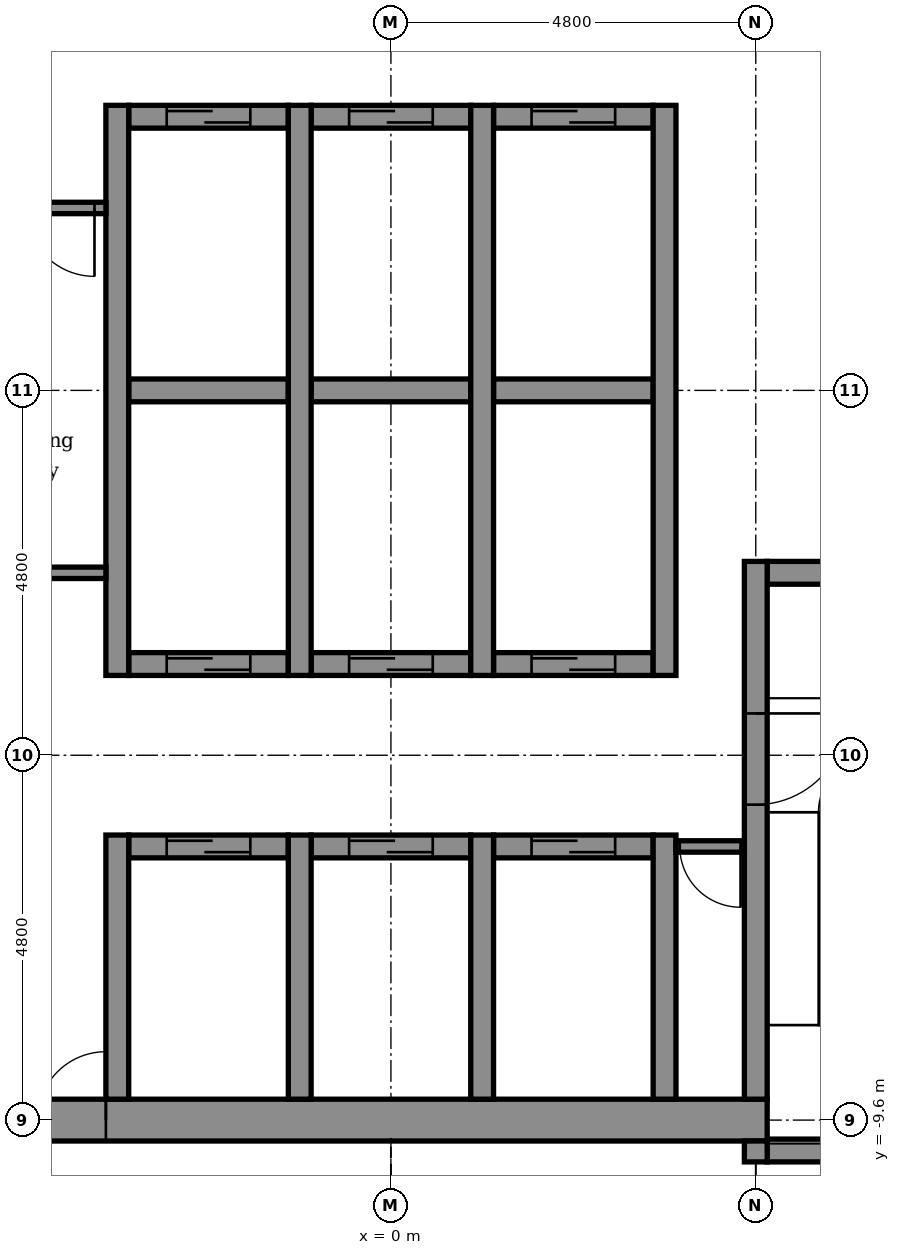
"""IFC4 building model, lengths in metres.
Left out: names, types, materials, properties, quantities, classifications, styles, units other than length and angle.
Written with IfcOpenShell. Run it as: python <this file> out.ifc"""

import sys

from ifc_helpers import new_model, si_unit, direction, frame, frame_2d, origin, place, context, subcontext, project, spatial, rectangle, extrude, element, fill, save


model = new_model("IFC4")
c1 = context("Model", 3, precision=1e-05, world=origin(), true_north=direction((0.0, 1.0)))
c2 = subcontext(c1, "Body", "Model", "MODEL_VIEW")
j1 = project(units=[si_unit("LENGTHUNIT", "METRE"), si_unit("PLANEANGLEUNIT", "RADIAN")], contexts=[c1])
p1 = place(None, origin())
s1 = spatial("IfcSite", under=j1, at=p1, CompositionType="ELEMENT")
p2 = place(p1, origin())
s2 = spatial("IfcBuilding", under=s1, at=p2, CompositionType="ELEMENT")
p3 = place(p2, frame((0.0, 0.0, 254.0)))
s3 = spatial("IfcBuildingStorey", under=s2, at=p3, CompositionType="ELEMENT", Elevation=254.0)
p4 = place(p3, frame((4.95, -10.0, -0.15), z_axis=(0.0, 0.0, 1.0), x_axis=(1.0, 0.0, 0.0)))
e1 = element("IfcWall", 1, at=p4, inside=s3, PredefinedType="STANDARD", context=c2, shape_type="SweptSolid", body=[
    extrude(rectangle(XDim=4.375, YDim=0.3, at=frame_2d((2.188, 0.0))), origin(), (0.0, 0.0, 1.0), 3.9),
])
p5 = place(p3, frame((-5.25, -9.6, -0.15), z_axis=(0.0, 0.0, 1.0), x_axis=(1.0, 0.0, 0.0)))
e2 = element("IfcWall", 2, at=p5, inside=s3, PredefinedType="SHEAR", context=c2, shape_type="SweptSolid", body=[
    extrude(rectangle(XDim=10.2, YDim=0.55, at=frame_2d((5.1, 0.0))), origin(), (0.0, 0.0, 1.0), 3.9),
])
p6 = place(p5, frame((0.6, 0.0, 0.15)))
e3 = element("IfcOpeningElement", 3, at=p6, cuts=e2, PredefinedType="OPENING", context=c2, shape_type="SweptSolid", body=[
    extrude(rectangle(XDim=0.9, YDim=2.1, at=frame_2d((0.45, 1.05))), frame((0.0, 0.285, 0.0), z_axis=(0.0, -1.0, 0.0), x_axis=(1.0, 0.0, 0.0)), (0.0, 0.0, 1.0), 0.57),
])
p7 = place(p3, frame((-3.45, -6.0, -0.15), z_axis=(0.0, 0.0, 1.0), x_axis=(1.0, 0.0, 0.0)))
e4 = element("IfcWall", 4, at=p7, inside=s3, PredefinedType="STANDARD", context=c2, shape_type="SweptSolid", body=[
    extrude(rectangle(XDim=2.1, YDim=0.3, at=frame_2d((1.05, 0.0))), origin(), (0.0, 0.0, 1.0), 3.9),
])
p8 = place(p7, frame((0.5, 0.0, 0.15)))
e5 = element("IfcOpeningElement", 5, at=p8, cuts=e4, PredefinedType="OPENING", context=c2, shape_type="SweptSolid", body=[
    extrude(rectangle(XDim=1.1, YDim=2.1, at=frame_2d((0.55, 1.05))), frame((0.0, 0.16, 0.0), z_axis=(0.0, -1.0, 0.0), x_axis=(1.0, 0.0, 0.0)), (0.0, 0.0, 1.0), 0.32),
])
p9 = place(p3, frame((-1.05, -6.0, -0.15), z_axis=(0.0, 0.0, 1.0), x_axis=(1.0, 0.0, 0.0)))
e6 = element("IfcWall", 6, at=p9, inside=s3, PredefinedType="STANDARD", context=c2, shape_type="SweptSolid", body=[
    extrude(rectangle(XDim=2.1, YDim=0.3, at=frame_2d((1.05, 0.0))), origin(), (0.0, 0.0, 1.0), 3.9),
])
p10 = place(p9, frame((0.5, 0.0, 0.15)))
e7 = element("IfcOpeningElement", 7, at=p10, cuts=e6, PredefinedType="OPENING", context=c2, shape_type="SweptSolid", body=[
    extrude(rectangle(XDim=1.1, YDim=2.1, at=frame_2d((0.55, 1.05))), frame((0.0, 0.16, 0.0), z_axis=(0.0, -1.0, 0.0), x_axis=(1.0, 0.0, 0.0)), (0.0, 0.0, 1.0), 0.32),
])
p11 = place(p3, frame((1.35, -6.0, -0.15), z_axis=(0.0, 0.0, 1.0), x_axis=(1.0, 0.0, 0.0)))
e8 = element("IfcWall", 8, at=p11, inside=s3, PredefinedType="STANDARD", context=c2, shape_type="SweptSolid", body=[
    extrude(rectangle(XDim=2.1, YDim=0.3, at=frame_2d((1.05, 0.0))), origin(), (0.0, 0.0, 1.0), 3.9),
])
p12 = place(p11, frame((0.5, 0.0, 0.15)))
e9 = element("IfcOpeningElement", 9, at=p12, cuts=e8, PredefinedType="OPENING", context=c2, shape_type="SweptSolid", body=[
    extrude(rectangle(XDim=1.1, YDim=2.1, at=frame_2d((0.55, 1.05))), frame((0.0, 0.16, 0.0), z_axis=(0.0, -1.0, 0.0), x_axis=(1.0, 0.0, 0.0)), (0.0, 0.0, 1.0), 0.32),
])
p13 = place(p3, frame((-3.45, -3.6, -0.15), z_axis=(0.0, 0.0, 1.0), x_axis=(1.0, 0.0, 0.0)))
e10 = element("IfcWall", 10, at=p13, inside=s3, PredefinedType="STANDARD", context=c2, shape_type="SweptSolid", body=[
    extrude(rectangle(XDim=2.1, YDim=0.3, at=frame_2d((1.05, 0.0))), origin(), (0.0, 0.0, 1.0), 3.9),
])
p14 = place(p13, frame((0.5, 0.0, 0.15)))
e11 = element("IfcOpeningElement", 11, at=p14, cuts=e10, PredefinedType="OPENING", context=c2, shape_type="SweptSolid", body=[
    extrude(rectangle(XDim=1.1, YDim=2.1, at=frame_2d((0.55, 1.05))), frame((0.0, 0.16, 0.0), z_axis=(0.0, -1.0, 0.0), x_axis=(1.0, 0.0, 0.0)), (0.0, 0.0, 1.0), 0.32),
])
p15 = place(p3, frame((-1.05, -3.6, -0.15), z_axis=(0.0, 0.0, 1.0), x_axis=(1.0, 0.0, 0.0)))
e12 = element("IfcWall", 12, at=p15, inside=s3, PredefinedType="STANDARD", context=c2, shape_type="SweptSolid", body=[
    extrude(rectangle(XDim=2.1, YDim=0.3, at=frame_2d((1.05, 0.0))), origin(), (0.0, 0.0, 1.0), 3.9),
])
p16 = place(p15, frame((0.5, 0.0, 0.15)))
e13 = element("IfcOpeningElement", 13, at=p16, cuts=e12, PredefinedType="OPENING", context=c2, shape_type="SweptSolid", body=[
    extrude(rectangle(XDim=1.1, YDim=2.1, at=frame_2d((0.55, 1.05))), frame((0.0, 0.16, 0.0), z_axis=(0.0, -1.0, 0.0), x_axis=(1.0, 0.0, 0.0)), (0.0, 0.0, 1.0), 0.32),
])
p17 = place(p3, frame((1.35, -3.6, -0.15), z_axis=(0.0, 0.0, 1.0), x_axis=(1.0, 0.0, 0.0)))
e14 = element("IfcWall", 14, at=p17, inside=s3, PredefinedType="STANDARD", context=c2, shape_type="SweptSolid", body=[
    extrude(rectangle(XDim=2.1, YDim=0.3, at=frame_2d((1.05, 0.0))), origin(), (0.0, 0.0, 1.0), 3.9),
])
p18 = place(p17, frame((0.5, 0.0, 0.15)))
e15 = element("IfcOpeningElement", 15, at=p18, cuts=e14, PredefinedType="OPENING", context=c2, shape_type="SweptSolid", body=[
    extrude(rectangle(XDim=1.1, YDim=2.1, at=frame_2d((0.55, 1.05))), frame((0.0, 0.16, 0.0), z_axis=(0.0, -1.0, 0.0), x_axis=(1.0, 0.0, 0.0)), (0.0, 0.0, 1.0), 0.32),
])
p19 = place(p3, frame((4.95, -2.4, -0.15), z_axis=(0.0, 0.0, 1.0), x_axis=(1.0, 0.0, 0.0)))
e16 = element("IfcWall", 16, at=p19, inside=s3, PredefinedType="STANDARD", context=c2, shape_type="SweptSolid", body=[
    extrude(rectangle(XDim=0.9, YDim=0.3, at=frame_2d((0.45, 0.0))), origin(), (0.0, 0.0, 1.0), 3.9),
])
p20 = place(p3, frame((-3.45, 0.0, -0.15), z_axis=(0.0, 0.0, 1.0), x_axis=(1.0, 0.0, 0.0)))
e17 = element("IfcWall", 17, at=p20, inside=s3, PredefinedType="STANDARD", context=c2, shape_type="SweptSolid", body=[
    extrude(rectangle(XDim=2.1, YDim=0.3, at=frame_2d((1.05, 0.0))), origin(), (0.0, 0.0, 1.0), 3.9),
])
p21 = place(p3, frame((-1.05, 0.0, -0.15), z_axis=(0.0, 0.0, 1.0), x_axis=(1.0, 0.0, 0.0)))
e18 = element("IfcWall", 18, at=p21, inside=s3, PredefinedType="STANDARD", context=c2, shape_type="SweptSolid", body=[
    extrude(rectangle(XDim=2.1, YDim=0.3, at=frame_2d((1.05, 0.0))), origin(), (0.0, 0.0, 1.0), 3.9),
])
p22 = place(p3, frame((1.35, 0.0, -0.15), z_axis=(0.0, 0.0, 1.0), x_axis=(1.0, 0.0, 0.0)))
e19 = element("IfcWall", 19, at=p22, inside=s3, PredefinedType="STANDARD", context=c2, shape_type="SweptSolid", body=[
    extrude(rectangle(XDim=2.1, YDim=0.3, at=frame_2d((1.05, 0.0))), origin(), (0.0, 0.0, 1.0), 3.9),
])
p23 = place(p3, frame((-3.45, 3.6, -0.15), z_axis=(0.0, 0.0, 1.0), x_axis=(1.0, 0.0, 0.0)))
e20 = element("IfcWall", 20, at=p23, inside=s3, PredefinedType="STANDARD", context=c2, shape_type="SweptSolid", body=[
    extrude(rectangle(XDim=2.1, YDim=0.3, at=frame_2d((1.05, 0.0))), origin(), (0.0, 0.0, 1.0), 3.9),
])
p24 = place(p23, frame((0.5, 0.0, 0.15)))
e21 = element("IfcOpeningElement", 21, at=p24, cuts=e20, PredefinedType="OPENING", context=c2, shape_type="SweptSolid", body=[
    extrude(rectangle(XDim=1.1, YDim=2.1, at=frame_2d((0.55, 1.05))), frame((0.0, 0.16, 0.0), z_axis=(0.0, -1.0, 0.0), x_axis=(1.0, 0.0, 0.0)), (0.0, 0.0, 1.0), 0.32),
])
p25 = place(p3, frame((-1.05, 3.6, -0.15), z_axis=(0.0, 0.0, 1.0), x_axis=(1.0, 0.0, 0.0)))
e22 = element("IfcWall", 22, at=p25, inside=s3, PredefinedType="STANDARD", context=c2, shape_type="SweptSolid", body=[
    extrude(rectangle(XDim=2.1, YDim=0.3, at=frame_2d((1.05, 0.0))), origin(), (0.0, 0.0, 1.0), 3.9),
])
p26 = place(p25, frame((0.5, 0.0, 0.15)))
e23 = element("IfcOpeningElement", 23, at=p26, cuts=e22, PredefinedType="OPENING", context=c2, shape_type="SweptSolid", body=[
    extrude(rectangle(XDim=1.1, YDim=2.1, at=frame_2d((0.55, 1.05))), frame((0.0, 0.16, 0.0), z_axis=(0.0, -1.0, 0.0), x_axis=(1.0, 0.0, 0.0)), (0.0, 0.0, 1.0), 0.32),
])
p27 = place(p3, frame((1.35, 3.6, -0.15), z_axis=(0.0, 0.0, 1.0), x_axis=(1.0, 0.0, 0.0)))
e24 = element("IfcWall", 24, at=p27, inside=s3, PredefinedType="STANDARD", context=c2, shape_type="SweptSolid", body=[
    extrude(rectangle(XDim=2.1, YDim=0.3, at=frame_2d((1.05, 0.0))), origin(), (0.0, 0.0, 1.0), 3.9),
])
p28 = place(p27, frame((0.5, 0.0, 0.15)))
e25 = element("IfcOpeningElement", 25, at=p28, cuts=e24, PredefinedType="OPENING", context=c2, shape_type="SweptSolid", body=[
    extrude(rectangle(XDim=1.1, YDim=2.1, at=frame_2d((0.55, 1.05))), frame((0.0, 0.16, 0.0), z_axis=(0.0, -1.0, 0.0), x_axis=(1.0, 0.0, 0.0)), (0.0, 0.0, 1.0), 0.32),
])
p29 = place(p3, frame((-3.6, -9.325, -0.15), z_axis=(0.0, 0.0, 1.0), x_axis=(0.0, 1.0, 0.0)))
e26 = element("IfcWall", 26, at=p29, inside=s3, PredefinedType="STANDARD", context=c2, shape_type="SweptSolid", body=[
    extrude(rectangle(XDim=3.475, YDim=0.3, at=frame_2d((1.737, 0.0))), origin(), (0.0, 0.0, 1.0), 3.9),
])
p30 = place(p3, frame((-3.6, -3.75, -0.15), z_axis=(0.0, 0.0, 1.0), x_axis=(0.0, 1.0, 0.0)))
e27 = element("IfcWall", 27, at=p30, inside=s3, PredefinedType="STANDARD", context=c2, shape_type="SweptSolid", body=[
    extrude(rectangle(XDim=7.5, YDim=0.3, at=frame_2d((3.75, 0.0))), origin(), (0.0, 0.0, 1.0), 3.9),
])
p31 = place(p3, frame((-1.2, -9.325, -0.15), z_axis=(0.0, 0.0, 1.0), x_axis=(0.0, 1.0, 0.0)))
e28 = element("IfcWall", 28, at=p31, inside=s3, PredefinedType="STANDARD", context=c2, shape_type="SweptSolid", body=[
    extrude(rectangle(XDim=3.475, YDim=0.3, at=frame_2d((1.737, 0.0))), origin(), (0.0, 0.0, 1.0), 3.9),
])
p32 = place(p3, frame((-1.2, -3.75, -0.15), z_axis=(0.0, 0.0, 1.0), x_axis=(0.0, 1.0, 0.0)))
e29 = element("IfcWall", 29, at=p32, inside=s3, PredefinedType="STANDARD", context=c2, shape_type="SweptSolid", body=[
    extrude(rectangle(XDim=7.5, YDim=0.3, at=frame_2d((3.75, 0.0))), origin(), (0.0, 0.0, 1.0), 3.9),
])
p33 = place(p3, frame((1.2, -9.325, -0.15), z_axis=(0.0, 0.0, 1.0), x_axis=(0.0, 1.0, 0.0)))
e30 = element("IfcWall", 30, at=p33, inside=s3, PredefinedType="STANDARD", context=c2, shape_type="SweptSolid", body=[
    extrude(rectangle(XDim=3.475, YDim=0.3, at=frame_2d((1.737, 0.0))), origin(), (0.0, 0.0, 1.0), 3.9),
])
p34 = place(p3, frame((1.2, -3.75, -0.15), z_axis=(0.0, 0.0, 1.0), x_axis=(0.0, 1.0, 0.0)))
e31 = element("IfcWall", 31, at=p34, inside=s3, PredefinedType="STANDARD", context=c2, shape_type="SweptSolid", body=[
    extrude(rectangle(XDim=7.5, YDim=0.3, at=frame_2d((3.75, 0.0))), origin(), (0.0, 0.0, 1.0), 3.9),
])
p35 = place(p3, frame((3.6, -9.325, -0.15), z_axis=(0.0, 0.0, 1.0), x_axis=(0.0, 1.0, 0.0)))
e32 = element("IfcWall", 32, at=p35, inside=s3, PredefinedType="STANDARD", context=c2, shape_type="SweptSolid", body=[
    extrude(rectangle(XDim=3.475, YDim=0.3, at=frame_2d((1.737, 0.0))), origin(), (0.0, 0.0, 1.0), 3.9),
])
p36 = place(p3, frame((3.6, -3.75, -0.15), z_axis=(0.0, 0.0, 1.0), x_axis=(0.0, 1.0, 0.0)))
e33 = element("IfcWall", 33, at=p36, inside=s3, PredefinedType="STANDARD", context=c2, shape_type="SweptSolid", body=[
    extrude(rectangle(XDim=7.5, YDim=0.3, at=frame_2d((3.75, 0.0))), origin(), (0.0, 0.0, 1.0), 3.9),
])
p37 = place(p3, frame((4.8, -10.15, -0.15), z_axis=(0.0, 0.0, 1.0), x_axis=(0.0, 1.0, 0.0)))
e34 = element("IfcWall", 34, at=p37, inside=s3, PredefinedType="STANDARD", context=c2, shape_type="SweptSolid", body=[
    extrude(rectangle(XDim=0.275, YDim=0.3, at=frame_2d((0.137, 0.0))), origin(), (0.0, 0.0, 1.0), 3.9),
])
p38 = place(p3, frame((4.8, -9.325, -0.15), z_axis=(0.0, 0.0, 1.0), x_axis=(0.0, 1.0, 0.0)))
e35 = element("IfcWall", 35, at=p38, inside=s3, PredefinedType="STANDARD", context=c2, shape_type="SweptSolid", body=[
    extrude(rectangle(XDim=7.075, YDim=0.3, at=frame_2d((3.538, 0.0))), origin(), (0.0, 0.0, 1.0), 3.9),
])
p39 = place(p38, frame((3.875, 0.0, 0.15)))
e36 = element("IfcOpeningElement", 36, at=p39, cuts=e35, PredefinedType="OPENING", context=c2, shape_type="SweptSolid", body=[
    extrude(rectangle(XDim=1.2, YDim=2.1, at=frame_2d((0.6, 1.05))), frame((0.0, 0.16, 0.0), z_axis=(0.0, -1.0, 0.0), x_axis=(1.0, 0.0, 0.0)), (0.0, 0.0, 1.0), 0.32),
])
p40 = place(p3, frame((3.75, -6.0, 0.0), z_axis=(0.0, 0.0, 1.0), x_axis=(1.0, 0.0, 0.0)))
e37 = element("IfcWall", 37, at=p40, inside=s3, PredefinedType="PARTITIONING", context=c2, shape_type="SweptSolid", body=[
    extrude(rectangle(XDim=0.9, YDim=0.15, at=frame_2d((0.45, 0.0))), origin(), (0.0, 0.0, 1.0), 3.75),
])
p41 = place(p40, frame((0.05, 0.0, 0.0)))
e38 = element("IfcOpeningElement", 38, at=p41, cuts=e37, PredefinedType="OPENING", context=c2, shape_type="SweptSolid", body=[
    extrude(rectangle(XDim=0.8, YDim=2.1, at=frame_2d((0.4, 1.05))), frame((0.0, 0.085, 0.0), z_axis=(0.0, -1.0, 0.0), x_axis=(1.0, 0.0, 0.0)), (0.0, 0.0, 1.0), 0.17),
])
p42 = place(p3, frame((-4.95, 2.4, 0.0), z_axis=(0.0, 0.0, 1.0), x_axis=(1.0, 0.0, 0.0)))
e39 = element("IfcWall", 39, at=p42, inside=s3, PredefinedType="PARTITIONING", context=c2, shape_type="SweptSolid", body=[
    extrude(rectangle(XDim=1.2, YDim=0.15, at=frame_2d((0.6, 0.0))), origin(), (0.0, 0.0, 1.0), 3.75),
])
p43 = place(p42, frame((0.15, 0.0, 0.0)))
e40 = element("IfcOpeningElement", 40, at=p43, cuts=e39, PredefinedType="OPENING", context=c2, shape_type="SweptSolid", body=[
    extrude(rectangle(XDim=0.9, YDim=2.1, at=frame_2d((0.45, 1.05))), frame((0.0, 0.085, 0.0), z_axis=(0.0, -1.0, 0.0), x_axis=(1.0, 0.0, 0.0)), (0.0, 0.0, 1.0), 0.17),
])
p44 = place(p3, frame((-4.95, -2.4, 0.0), z_axis=(0.0, 0.0, 1.0), x_axis=(1.0, 0.0, 0.0)))
e41 = element("IfcWall", 41, at=p44, inside=s3, PredefinedType="PARTITIONING", context=c2, shape_type="SweptSolid", body=[
    extrude(rectangle(XDim=1.2, YDim=0.15, at=frame_2d((0.6, 0.0))), origin(), (0.0, 0.0, 1.0), 3.75),
])
p45 = place(p41, frame((0.8, 0.0, 0.0), z_axis=(0.0, 0.0, 1.0), x_axis=(-1.0, 0.0, 0.0)))
e42 = element("IfcDoor", 42, at=p45, inside=s3, OperationType="SINGLE_SWING_RIGHT", PredefinedType="DOOR", context=c2, shape_type="SweptSolid", body=[
    extrude(rectangle(XDim=0.8, YDim=2.1, at=frame_2d((0.4, 1.05))), frame((0.0, 0.025, 0.0), z_axis=(0.0, -1.0, 0.0), x_axis=(1.0, 0.0, 0.0)), (0.0, 0.0, 1.0), 0.05),
])
fill(e38, e42)
p46 = place(p24, origin())
e43 = element("IfcDoor", 43, at=p46, inside=s3, OperationType="DOUBLE_DOOR_SLIDING", PredefinedType="DOOR", context=c2, shape_type="SweptSolid", body=[
    extrude(rectangle(XDim=1.1, YDim=2.1, at=frame_2d((0.55, 1.05))), frame((0.0, 0.025, 0.0), z_axis=(0.0, -1.0, 0.0), x_axis=(1.0, 0.0, 0.0)), (0.0, 0.0, 1.0), 0.05),
])
fill(e21, e43)
p47 = place(p26, origin())
e44 = element("IfcDoor", 44, at=p47, inside=s3, OperationType="DOUBLE_DOOR_SLIDING", PredefinedType="DOOR", context=c2, shape_type="SweptSolid", body=[
    extrude(rectangle(XDim=1.1, YDim=2.1, at=frame_2d((0.55, 1.05))), frame((0.0, 0.025, 0.0), z_axis=(0.0, -1.0, 0.0), x_axis=(1.0, 0.0, 0.0)), (0.0, 0.0, 1.0), 0.05),
])
fill(e23, e44)
p48 = place(p28, origin())
e45 = element("IfcDoor", 45, at=p48, inside=s3, OperationType="DOUBLE_DOOR_SLIDING", PredefinedType="DOOR", context=c2, shape_type="SweptSolid", body=[
    extrude(rectangle(XDim=1.1, YDim=2.1, at=frame_2d((0.55, 1.05))), frame((0.0, 0.025, 0.0), z_axis=(0.0, -1.0, 0.0), x_axis=(1.0, 0.0, 0.0)), (0.0, 0.0, 1.0), 0.05),
])
fill(e25, e45)
p49 = place(p14, origin())
e46 = element("IfcDoor", 46, at=p49, inside=s3, OperationType="DOUBLE_DOOR_SLIDING", PredefinedType="DOOR", context=c2, shape_type="SweptSolid", body=[
    extrude(rectangle(XDim=1.1, YDim=2.1, at=frame_2d((0.55, 1.05))), frame((0.0, 0.025, 0.0), z_axis=(0.0, -1.0, 0.0), x_axis=(1.0, 0.0, 0.0)), (0.0, 0.0, 1.0), 0.05),
])
fill(e11, e46)
p50 = place(p16, origin())
e47 = element("IfcDoor", 47, at=p50, inside=s3, OperationType="DOUBLE_DOOR_SLIDING", PredefinedType="DOOR", context=c2, shape_type="SweptSolid", body=[
    extrude(rectangle(XDim=1.1, YDim=2.1, at=frame_2d((0.55, 1.05))), frame((0.0, 0.025, 0.0), z_axis=(0.0, -1.0, 0.0), x_axis=(1.0, 0.0, 0.0)), (0.0, 0.0, 1.0), 0.05),
])
fill(e13, e47)
p51 = place(p18, origin())
e48 = element("IfcDoor", 48, at=p51, inside=s3, OperationType="DOUBLE_DOOR_SLIDING", PredefinedType="DOOR", context=c2, shape_type="SweptSolid", body=[
    extrude(rectangle(XDim=1.1, YDim=2.1, at=frame_2d((0.55, 1.05))), frame((0.0, 0.025, 0.0), z_axis=(0.0, -1.0, 0.0), x_axis=(1.0, 0.0, 0.0)), (0.0, 0.0, 1.0), 0.05),
])
fill(e15, e48)
p52 = place(p8, origin())
e49 = element("IfcDoor", 49, at=p52, inside=s3, OperationType="DOUBLE_DOOR_SLIDING", PredefinedType="DOOR", context=c2, shape_type="SweptSolid", body=[
    extrude(rectangle(XDim=1.1, YDim=2.1, at=frame_2d((0.55, 1.05))), frame((0.0, 0.025, 0.0), z_axis=(0.0, -1.0, 0.0), x_axis=(1.0, 0.0, 0.0)), (0.0, 0.0, 1.0), 0.05),
])
fill(e5, e49)
p53 = place(p10, origin())
e50 = element("IfcDoor", 50, at=p53, inside=s3, OperationType="DOUBLE_DOOR_SLIDING", PredefinedType="DOOR", context=c2, shape_type="SweptSolid", body=[
    extrude(rectangle(XDim=1.1, YDim=2.1, at=frame_2d((0.55, 1.05))), frame((0.0, 0.025, 0.0), z_axis=(0.0, -1.0, 0.0), x_axis=(1.0, 0.0, 0.0)), (0.0, 0.0, 1.0), 0.05),
])
fill(e7, e50)
p54 = place(p12, origin())
e51 = element("IfcDoor", 51, at=p54, inside=s3, OperationType="DOUBLE_DOOR_SLIDING", PredefinedType="DOOR", context=c2, shape_type="SweptSolid", body=[
    extrude(rectangle(XDim=1.1, YDim=2.1, at=frame_2d((0.55, 1.05))), frame((0.0, 0.025, 0.0), z_axis=(0.0, -1.0, 0.0), x_axis=(1.0, 0.0, 0.0)), (0.0, 0.0, 1.0), 0.05),
])
fill(e9, e51)
p55 = place(p39, frame((1.2, 0.0, 0.0), z_axis=(0.0, 0.0, 1.0), x_axis=(-1.0, 0.0, 0.0)))
e52 = element("IfcDoor", 52, at=p55, inside=s3, OperationType="SINGLE_SWING_RIGHT", PredefinedType="DOOR", context=c2, shape_type="SweptSolid", body=[
    extrude(rectangle(XDim=1.2, YDim=2.1, at=frame_2d((0.6, 1.05))), frame((0.0, 0.025, 0.0), z_axis=(0.0, -1.0, 0.0), x_axis=(1.0, 0.0, 0.0)), (0.0, 0.0, 1.0), 0.05),
])
fill(e36, e52)
p56 = place(p6, origin())
e53 = element("IfcDoor", 53, at=p56, inside=s3, OperationType="SINGLE_SWING_RIGHT", PredefinedType="DOOR", context=c2, shape_type="SweptSolid", body=[
    extrude(rectangle(XDim=0.9, YDim=2.1, at=frame_2d((0.45, 1.05))), frame((0.0, 0.025, 0.0), z_axis=(0.0, -1.0, 0.0), x_axis=(1.0, 0.0, 0.0)), (0.0, 0.0, 1.0), 0.05),
])
fill(e3, e53)
p57 = place(p43, frame((0.9, 0.0, 0.0), z_axis=(0.0, 0.0, 1.0), x_axis=(-1.0, 0.0, 0.0)))
e54 = element("IfcDoor", 54, at=p57, inside=s3, OperationType="SINGLE_SWING_RIGHT", PredefinedType="DOOR", context=c2, shape_type="SweptSolid", body=[
    extrude(rectangle(XDim=0.9, YDim=2.1, at=frame_2d((0.45, 1.05))), frame((0.0, 0.025, 0.0), z_axis=(0.0, -1.0, 0.0), x_axis=(1.0, 0.0, 0.0)), (0.0, 0.0, 1.0), 0.05),
])
fill(e40, e54)
save(model, sys.argv[1])
